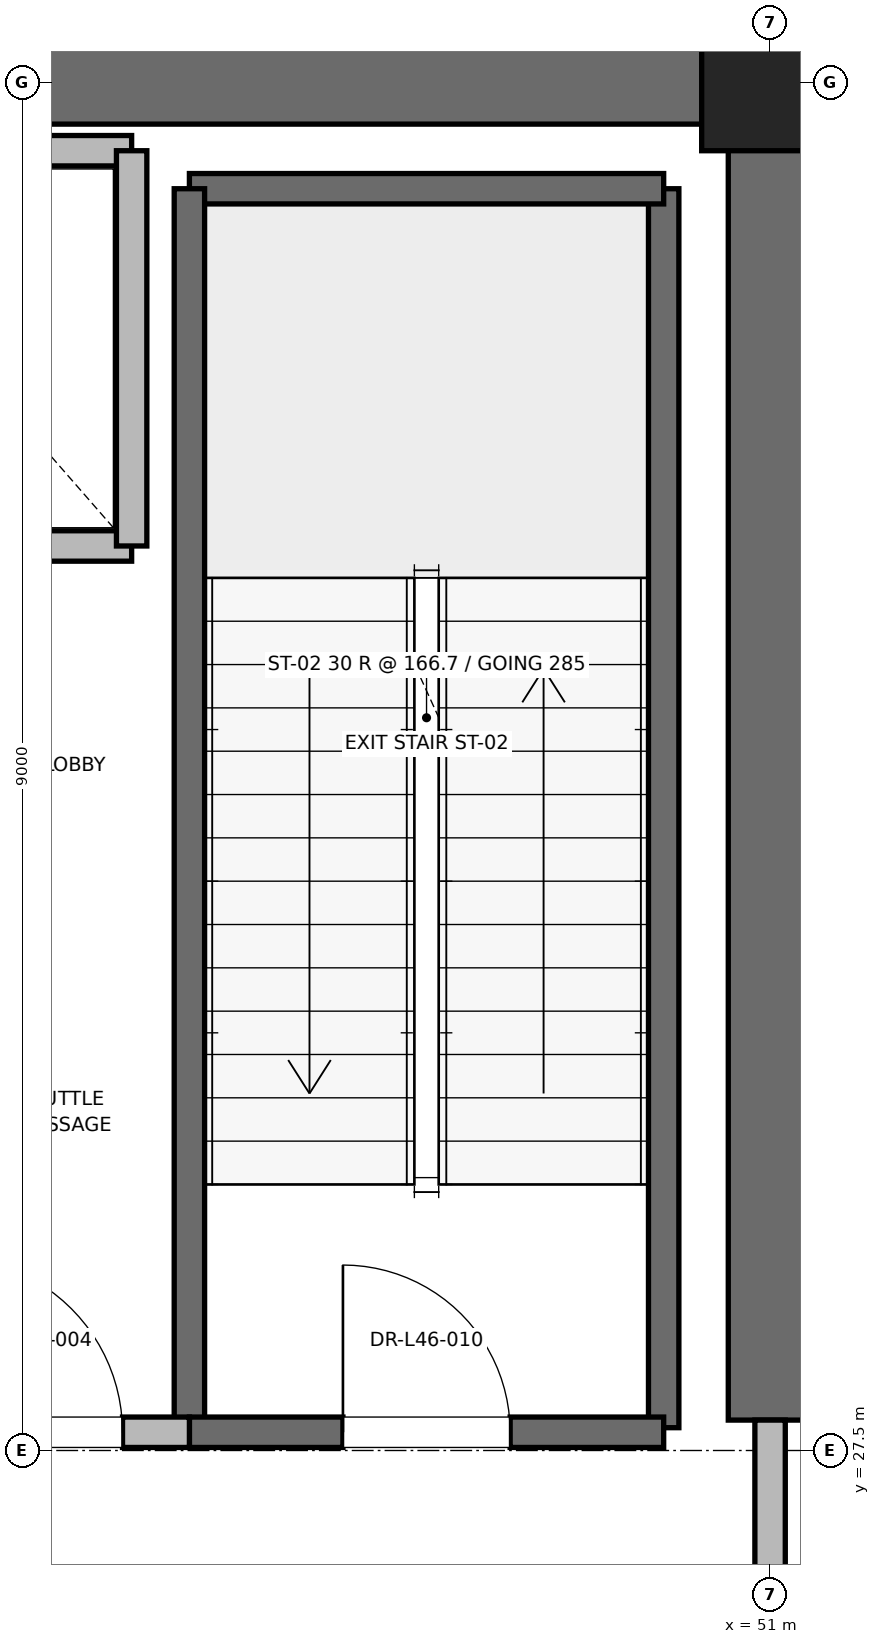
"""IFC4 building model, lengths in metres.
Left out: names, types, materials, properties, quantities, classifications, styles, units other than length and angle.
Written with IfcOpenShell. Run it as: python <this file> out.ifc"""

import sys

from ifc_helpers import new_model, si_unit, direction, frame, frame_2d, origin, origin_2d, place, context, subcontext, project, spatial, rectangle, extrude, element, fill, save


model = new_model("IFC4")
c1 = context("Model", 3, precision=1e-05, world=origin(), true_north=direction((0.0, 1.0)))
c2 = subcontext(c1, "Body", "Model", "MODEL_VIEW")
j1 = project(units=[si_unit("LENGTHUNIT", "METRE"), si_unit("PLANEANGLEUNIT", "RADIAN")], contexts=[c1])
p1 = place(None, origin())
s1 = spatial("IfcSite", under=j1, at=p1, CompositionType="ELEMENT")
p2 = place(p1, origin())
s2 = spatial("IfcBuilding", under=s1, at=p2, CompositionType="ELEMENT")
p3 = place(p2, frame((0.0, 0.0, 200.2)))
s3 = spatial("IfcBuildingStorey", under=s2, at=p3, CompositionType="ELEMENT", Elevation=200.2)
p4 = place(p3, frame((51.0, 36.5, 0.0), z_axis=(0.0, 0.0, 1.0), x_axis=(1.0, 0.0, 0.0)))
e1 = element("IfcColumn", 1, at=p4, inside=s3, PredefinedType="PILASTER", context=c2, shape_type="SweptSolid", body=[
    extrude(rectangle(XDim=0.9, YDim=0.9, at=origin_2d()), origin(), (0.0, 0.0, 1.0), 5.0),
])
p5 = place(p3, frame((45.2, 36.5, 0.0), z_axis=(0.0, 0.0, 1.0), x_axis=(1.0, 0.0, 0.0)))
e2 = element("IfcWall", 2, at=p5, inside=s3, PredefinedType="SHEAR", context=c2, shape_type="SweptSolid", body=[
    extrude(rectangle(XDim=5.8, YDim=0.55, at=frame_2d((2.9, 0.0))), origin(), (0.0, 0.0, 1.0), 4.775),
])
p6 = place(p3, frame((51.0, 27.7, 0.0), z_axis=(0.0, 0.0, 1.0), x_axis=(0.0, 1.0, 0.0)))
e3 = element("IfcWall", 3, at=p6, inside=s3, PredefinedType="SHEAR", context=c2, shape_type="SweptSolid", body=[
    extrude(rectangle(XDim=8.8, YDim=0.55, at=frame_2d((4.4, 0.0))), origin(), (0.0, 0.0, 1.0), 4.775),
])
p7 = place(p3, frame((50.3, 27.65, 0.0), z_axis=(0.0, 0.0, 1.0), x_axis=(0.0, 1.0, 0.0)))
e4 = element("IfcWall", 4, at=p7, inside=s3, PredefinedType="SOLIDWALL", context=c2, shape_type="SweptSolid", body=[
    extrude(rectangle(XDim=8.15, YDim=0.2, at=frame_2d((4.075, 0.0))), origin(), (0.0, 0.0, 1.0), 4.775),
])
p8 = place(p3, frame((47.18, 35.8, 0.0), z_axis=(0.0, 0.0, 1.0), x_axis=(1.0, 0.0, 0.0)))
e5 = element("IfcWall", 5, at=p8, inside=s3, PredefinedType="SOLIDWALL", context=c2, shape_type="SweptSolid", body=[
    extrude(rectangle(XDim=3.12, YDim=0.2, at=frame_2d((1.56, 0.0))), origin(), (0.0, 0.0, 1.0), 4.775),
])
p9 = place(p3, frame((47.18, 27.62, 0.0), z_axis=(0.0, 0.0, 1.0), x_axis=(0.0, 1.0, 0.0)))
e6 = element("IfcWall", 6, at=p9, inside=s3, PredefinedType="SOLIDWALL", context=c2, shape_type="SweptSolid", body=[
    extrude(rectangle(XDim=8.18, YDim=0.2, at=frame_2d((4.09, 0.0))), origin(), (0.0, 0.0, 1.0), 4.775),
])
p10 = place(p3, frame((47.18, 27.62, 0.0), z_axis=(0.0, 0.0, 1.0), x_axis=(1.0, 0.0, 0.0)))
e7 = element("IfcWall", 7, at=p10, inside=s3, PredefinedType="SOLIDWALL", context=c2, shape_type="SweptSolid", body=[
    extrude(rectangle(XDim=3.12, YDim=0.2, at=frame_2d((1.56, 0.0))), origin(), (0.0, 0.0, 1.0), 4.775),
])
p11 = place(p10, frame((1.01, 0.0, 0.0)))
e8 = element("IfcOpeningElement", 8, at=p11, cuts=e7, PredefinedType="OPENING", context=c2, shape_type="SweptSolid", body=[
    extrude(rectangle(XDim=1.1, YDim=2.15, at=frame_2d((0.55, 1.075))), frame((0.0, 0.1, 0.0), z_axis=(0.0, -1.0, 0.0), x_axis=(1.0, 0.0, 0.0)), (0.0, 0.0, 1.0), 0.2),
])
p12 = place(p3, frame((45.15, 27.62, 0.0), z_axis=(0.0, 0.0, 1.0), x_axis=(1.0, 0.0, 0.0)))
e9 = element("IfcWall", 9, at=p12, inside=s3, PredefinedType="PARTITIONING", context=c2, shape_type="SweptSolid", body=[
    extrude(rectangle(XDim=2.03, YDim=0.2, at=frame_2d((1.015, 0.0))), origin(), (0.0, 0.0, 1.0), 4.775),
])
p13 = place(p12, frame((0.44, 0.0, 0.0)))
e10 = element("IfcOpeningElement", 10, at=p13, cuts=e9, PredefinedType="OPENING", context=c2, shape_type="SweptSolid", body=[
    extrude(rectangle(XDim=1.15, YDim=2.2, at=frame_2d((0.575, 1.1))), frame((0.0, 0.1, 0.0), z_axis=(0.0, -1.0, 0.0), x_axis=(1.0, 0.0, 0.0)), (0.0, 0.0, 1.0), 0.2),
])
p14 = place(p3, frame((51.0, 24.3, 0.0), z_axis=(0.0, 0.0, 1.0), x_axis=(0.0, 1.0, 0.0)))
e11 = element("IfcWall", 11, at=p14, inside=s3, PredefinedType="PARTITIONING", context=c2, shape_type="SweptSolid", body=[
    extrude(rectangle(XDim=3.4, YDim=0.2, at=frame_2d((1.7, 0.0))), origin(), (0.0, 0.0, 1.0), 3.755),
])
p15 = place(p14, frame((1.125, 0.0, 0.0)))
e12 = element("IfcOpeningElement", 12, at=p15, cuts=e11, PredefinedType="OPENING", context=c2, shape_type="SweptSolid", body=[
    extrude(rectangle(XDim=1.15, YDim=2.2, at=frame_2d((0.575, 1.1))), frame((0.0, 0.1, 0.0), z_axis=(0.0, -1.0, 0.0), x_axis=(1.0, 0.0, 0.0)), (0.0, 0.0, 1.0), 0.2),
])
p16 = place(p3, frame((44.5, 33.45, 0.0), z_axis=(0.0, 0.0, 1.0), x_axis=(1.0, 0.0, 0.0)))
e13 = element("IfcWall", 13, at=p16, inside=s3, PredefinedType="SOLIDWALL", context=c2, shape_type="SweptSolid", body=[
    extrude(rectangle(XDim=2.3, YDim=0.2, at=frame_2d((1.15, 0.0))), origin(), (0.0, 0.0, 1.0), 4.775),
])
p17 = place(p3, frame((46.8, 36.05, 0.0), z_axis=(0.0, 0.0, 1.0), x_axis=(-1.0, 0.0, 0.0)))
e14 = element("IfcWall", 14, at=p17, inside=s3, PredefinedType="SOLIDWALL", context=c2, shape_type="SweptSolid", body=[
    extrude(rectangle(XDim=2.3, YDim=0.2, at=frame_2d((1.15, 0.0))), origin(), (0.0, 0.0, 1.0), 3.755),
])
p18 = place(p3, frame((46.8, 33.45, 0.0), z_axis=(0.0, 0.0, 1.0), x_axis=(0.0, 1.0, 0.0)))
e15 = element("IfcWall", 15, at=p18, inside=s3, PredefinedType="SOLIDWALL", context=c2, shape_type="SweptSolid", body=[
    extrude(rectangle(XDim=2.6, YDim=0.2, at=frame_2d((1.3, 0.0))), origin(), (0.0, 0.0, 1.0), 4.775),
])
p19 = place(p11, origin())
e16 = element("IfcDoor", 16, at=p19, inside=s3, OperationType="SINGLE_SWING_LEFT", PredefinedType="DOOR", context=c2, shape_type="SweptSolid", body=[
    extrude(rectangle(XDim=1.1, YDim=2.15, at=frame_2d((0.55, 1.075))), frame((0.0, 0.025, 0.0), z_axis=(0.0, -1.0, 0.0), x_axis=(1.0, 0.0, 0.0)), (0.0, 0.0, 1.0), 0.05),
])
fill(e8, e16)
p20 = place(p13, origin())
e17 = element("IfcDoor", 17, at=p20, inside=s3, OperationType="SINGLE_SWING_LEFT", PredefinedType="DOOR", context=c2, shape_type="SweptSolid", body=[
    extrude(rectangle(XDim=1.15, YDim=2.2, at=frame_2d((0.575, 1.1))), frame((0.0, 0.025, 0.0), z_axis=(0.0, -1.0, 0.0), x_axis=(1.0, 0.0, 0.0)), (0.0, 0.0, 1.0), 0.05),
])
fill(e10, e17)
save(model, sys.argv[1])
